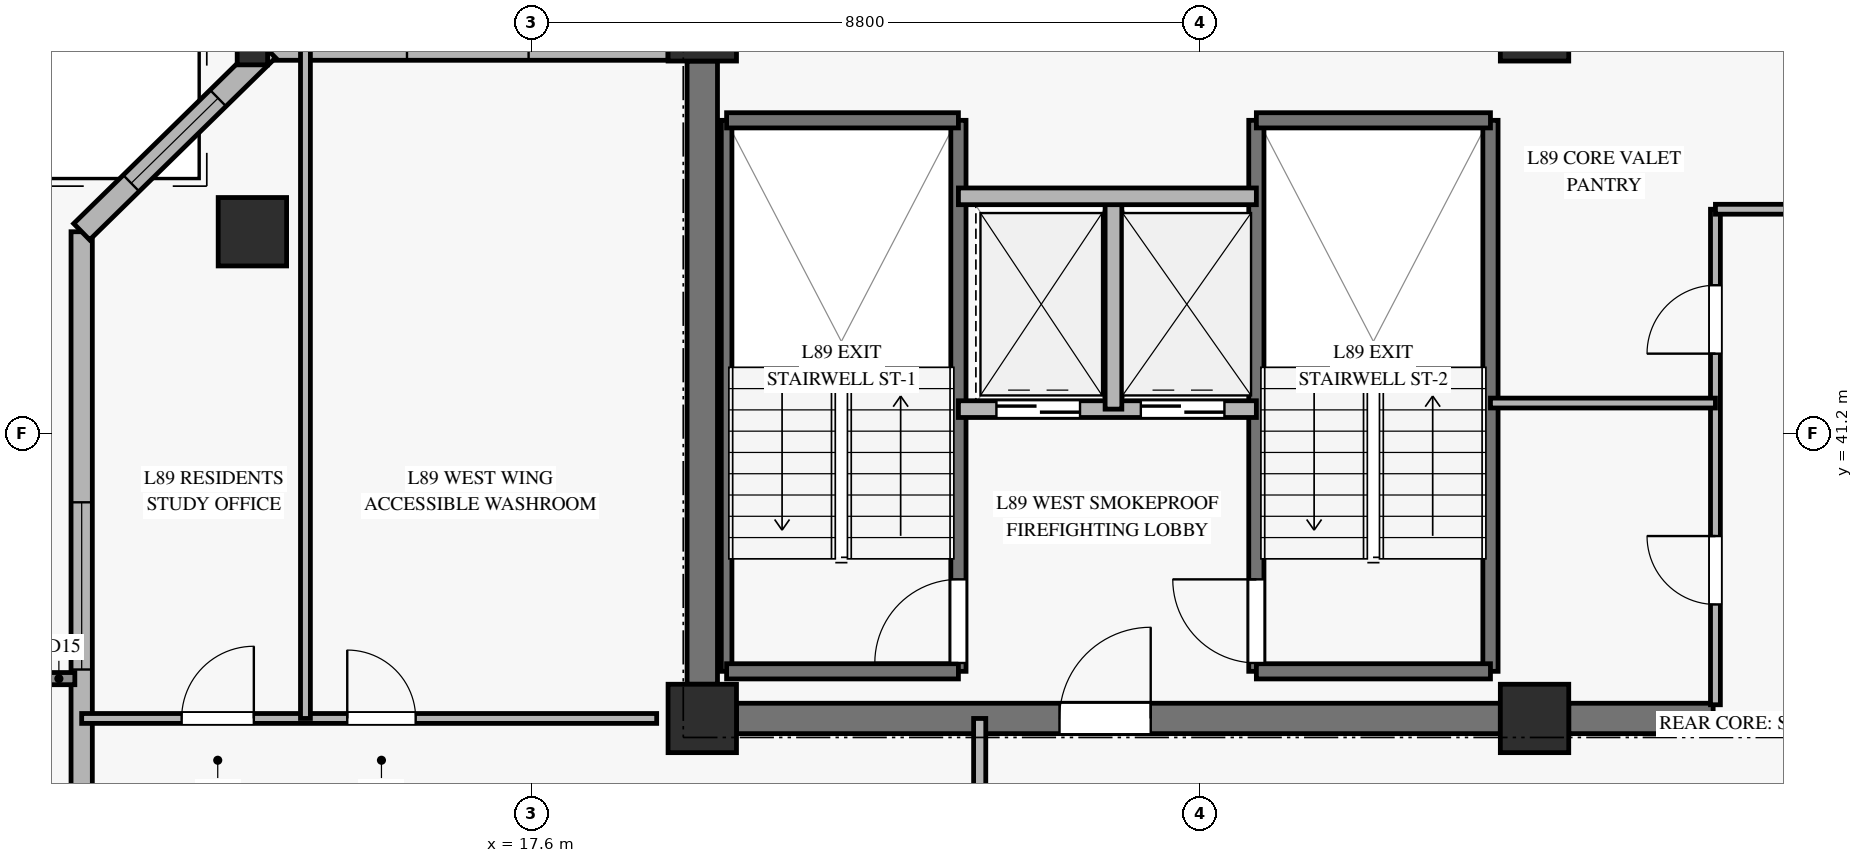
"""IFC4 building model, lengths in metres.
Left out: names, types, materials, properties, quantities, classifications, styles, units other than length and angle.
Written with IfcOpenShell. Run it as: python <this file> out.ifc"""

import sys

from ifc_helpers import new_model, si_unit, direction, frame, frame_2d, origin, origin_2d, place, context, subcontext, project, spatial, rectangle, hollow_rectangle, extrude, source, transform, mapped, element, fill, save


model = new_model("IFC4")
c1 = context("Model", 3, precision=1e-05, world=origin(), true_north=direction((0.0, 1.0)))
c2 = subcontext(c1, "Body", "Model", "MODEL_VIEW")
j1 = project(units=[si_unit("LENGTHUNIT", "METRE"), si_unit("PLANEANGLEUNIT", "RADIAN")], contexts=[c1])
p1 = place(None, origin())
s1 = spatial("IfcSite", under=j1, at=p1, CompositionType="ELEMENT")
p2 = place(p1, origin())
s2 = spatial("IfcBuilding", under=s1, at=p2, CompositionType="ELEMENT")
p3 = place(p2, frame((0.0, 0.0, 342.5)))
s3 = spatial("IfcBuildingStorey", under=s2, at=p3, CompositionType="ELEMENT", Elevation=342.5)
m1 = source(origin(), c2, "Body", "SweptSolid", [
    extrude(rectangle(XDim=0.9, YDim=0.9, at=origin_2d()), origin(), (0.0, 0.0, 1.0), 3.185),
])
for number, where, z_axis, x_axis in (
    (1, (19.85, 37.45, 0.0), (0.0, 0.0, 1.0), (1.0, 0.0, 0.0)),
    (2, (19.85, 46.55, 0.0), (0.0, 0.0, 1.0), (1.0, 0.0, 0.0)),
    (3, (30.8, 37.45, 0.0), (0.0, 0.0, 1.0), (1.0, 0.0, 0.0)),
    (4, (30.8, 46.55, 0.0), (0.0, 0.0, 1.0), (1.0, 0.0, 0.0)),
):
    element("IfcColumn", number, at=place(p3, frame(where, z_axis=z_axis, x_axis=x_axis)), inside=s3, PredefinedType="PILASTER", context=c2, shape_type="MappedRepresentation", body=[
        mapped(m1, transform((0.0, 0.0, 0.0), x_axis=(1.0, 0.0, 0.0), y_axis=(0.0, 1.0, 0.0), z_axis=(0.0, 0.0, 1.0), scale=1.0)),
    ])
p4 = place(p3, frame((20.3, 37.45, 0.0), z_axis=(0.0, 0.0, 1.0), x_axis=(1.0, 0.0, 0.0)))
e5 = element("IfcWall", 5, at=p4, inside=s3, PredefinedType="SHEAR", context=c2, shape_type="SweptSolid", body=[
    extrude(rectangle(XDim=10.05, YDim=0.4, at=frame_2d((5.025, 0.0))), origin(), (0.0, 0.0, 1.0), 3.185),
])
p5 = place(p4, frame((4.25, 0.0, 0.0)))
e6 = element("IfcOpeningElement", 6, at=p5, cuts=e5, PredefinedType="OPENING", context=c2, shape_type="SweptSolid", body=[
    extrude(rectangle(XDim=1.2, YDim=2.15, at=frame_2d((0.6, 1.075))), frame((0.0, 0.21, 0.0), z_axis=(0.0, -1.0, 0.0), x_axis=(1.0, 0.0, 0.0)), (0.0, 0.0, 1.0), 0.42),
])
p6 = place(p3, frame((31.25, 37.45, 0.0), z_axis=(0.0, 0.0, 1.0), x_axis=(1.0, 0.0, 0.0)))
e7 = element("IfcWall", 7, at=p6, inside=s3, PredefinedType="SHEAR", context=c2, shape_type="SweptSolid", body=[
    extrude(rectangle(XDim=1.9, YDim=0.4, at=frame_2d((0.95, 0.0))), origin(), (0.0, 0.0, 1.0), 3.185),
])
p7 = place(p3, frame((19.85, 37.9, 0.0), z_axis=(0.0, 0.0, 1.0), x_axis=(0.0, 1.0, 0.0)))
e8 = element("IfcWall", 8, at=p7, inside=s3, PredefinedType="SHEAR", context=c2, shape_type="SweptSolid", body=[
    extrude(rectangle(XDim=8.2, YDim=0.4, at=frame_2d((4.1, 0.0))), origin(), (0.0, 0.0, 1.0), 3.185),
])
m2 = source(origin(), c2, "Body", "SweptSolid", [
    extrude(hollow_rectangle(XDim=0.9, YDim=0.9, WallThickness=0.04, at=origin_2d()), origin(), (0.0, 0.0, 1.0), 3.207),
])
p8 = place(p3, frame((13.931, 43.854, 0.0), z_axis=(0.115115171504, 0.014313262065, 0.993249026085), x_axis=(-0.123388483821, 0.992358444344, 0.0)))
e9 = element("IfcColumn", 9, at=p8, inside=s3, PredefinedType="COLUMN", context=c2, shape_type="MappedRepresentation", body=[
    mapped(m2, transform((0.0, 0.0, 0.0), x_axis=(1.0, 0.0, 0.0), y_axis=(0.0, 1.0, 0.0), z_axis=(0.0, 0.0, 1.0), scale=1.0)),
])
m3 = source(origin(), c2, "Body", "SweptSolid", [
    extrude(hollow_rectangle(XDim=0.4, YDim=0.4, WallThickness=0.02, at=origin_2d()), origin(), (0.0, 0.0, 1.0), 3.206),
])
p9 = place(p3, frame((13.931, 46.25, 0.0), z_axis=(0.115126965108, 0.0, 0.993350784922), x_axis=(0.0, 1.0, 0.0)))
e10 = element("IfcColumn", 10, at=p9, inside=s3, PredefinedType="COLUMN", context=c2, shape_type="MappedRepresentation", body=[
    mapped(m3, transform((0.0, 0.0, 0.0), x_axis=(1.0, 0.0, 0.0), y_axis=(0.0, 1.0, 0.0), z_axis=(0.0, 0.0, 1.0), scale=1.0)),
])
p10 = place(p3, frame((11.685, 34.534, 0.0), z_axis=(0.0, 0.0, 1.0), x_axis=(0.0, 1.0, 0.0)))
e11 = element("IfcWall", 11, at=p10, inside=s3, PredefinedType="SOLIDWALL", context=c2, shape_type="SweptSolid", body=[
    extrude(rectangle(XDim=9.32, YDim=0.28, at=frame_2d((4.66, 0.0))), origin(), (0.0, 0.0, 1.0), 2.815),
])
p11 = place(p10, frame((3.56, 0.0, 0.45)))
e12 = element("IfcOpeningElement", 12, at=p11, cuts=e11, PredefinedType="OPENING", context=c2, shape_type="SweptSolid", body=[
    extrude(rectangle(XDim=2.2, YDim=2.1, at=frame_2d((1.1, 1.05))), frame((0.0, 0.15, 0.0), z_axis=(0.0, -1.0, 0.0), x_axis=(1.0, 0.0, 0.0)), (0.0, 0.0, 1.0), 0.3),
])
p12 = place(p3, frame((14.131, 46.25, 0.0), z_axis=(0.0, 0.0, 1.0), x_axis=(1.0, 0.0, 0.0)))
e13 = element("IfcWall", 13, at=p12, inside=s3, PredefinedType="SOLIDWALL", context=c2, shape_type="SweptSolid", body=[
    extrude(rectangle(XDim=5.269, YDim=0.28, at=frame_2d((2.634, 0.0))), origin(), (0.0, 0.0, 1.0), 2.815),
])
p13 = place(p12, frame((1.834, 0.0, 0.45)))
e14 = element("IfcOpeningElement", 14, at=p13, cuts=e13, PredefinedType="OPENING", context=c2, shape_type="SweptSolid", body=[
    extrude(rectangle(XDim=1.6, YDim=2.0, at=frame_2d((0.8, 1.0))), frame((0.0, 0.15, 0.0), z_axis=(0.0, -1.0, 0.0), x_axis=(1.0, 0.0, 0.0)), (0.0, 0.0, 1.0), 0.3),
])
p14 = place(p3, frame((14.131, 46.25, 0.0), z_axis=(0.0, 0.0, 1.0), x_axis=(-0.714377494024, -0.699760527632, 0.0)))
e15 = element("IfcWall", 15, at=p14, inside=s3, PredefinedType="SOLIDWALL", context=c2, shape_type="SweptSolid", body=[
    extrude(rectangle(XDim=3.424, YDim=0.3, at=frame_2d((1.712, 0.0))), origin(), (0.0, 0.0, 1.0), 2.815),
])
p15 = place(p14, frame((0.912, 0.0, 0.45)))
e16 = element("IfcOpeningElement", 16, at=p15, cuts=e15, PredefinedType="OPENING", context=c2, shape_type="SweptSolid", body=[
    extrude(rectangle(XDim=1.6, YDim=2.0, at=frame_2d((0.8, 1.0))), frame((0.0, 0.16, 0.0), z_axis=(0.0, -1.0, 0.0), x_axis=(1.0, 0.0, 0.0)), (0.0, 0.0, 1.0), 0.32),
])
p16 = place(p3, frame((20.17, 38.07, 0.0), z_axis=(0.0, 0.0, 1.0), x_axis=(0.0, 1.0, 0.0)))
e17 = element("IfcWall", 17, at=p16, inside=s3, PredefinedType="SOLIDWALL", context=c2, shape_type="SweptSolid", body=[
    extrude(rectangle(XDim=7.25, YDim=0.14, at=frame_2d((3.625, 0.0))), origin(), (0.0, 0.0, 1.0), 3.4),
])
p17 = place(p3, frame((23.22, 38.07, 0.0), z_axis=(0.0, 0.0, 1.0), x_axis=(0.0, 1.0, 0.0)))
e18 = element("IfcWall", 18, at=p17, inside=s3, PredefinedType="SOLIDWALL", context=c2, shape_type="SweptSolid", body=[
    extrude(rectangle(XDim=7.25, YDim=0.2, at=frame_2d((3.625, 0.0))), origin(), (0.0, 0.0, 1.0), 3.4),
])
p18 = place(p17, frame((0.11, 0.0, 0.0)))
e19 = element("IfcOpeningElement", 19, at=p18, cuts=e18, PredefinedType="OPENING", context=c2, shape_type="SweptSolid", body=[
    extrude(rectangle(XDim=1.1, YDim=2.15, at=frame_2d((0.55, 1.075))), frame((0.0, 0.11, 0.0), z_axis=(0.0, -1.0, 0.0), x_axis=(1.0, 0.0, 0.0)), (0.0, 0.0, 1.0), 0.22),
])
for number, where, z_axis, x_axis in (
    (20, (20.17, 45.32, 0.0), (0.0, 0.0, 1.0), (1.0, 0.0, 0.0)),
    (21, (20.17, 38.07, 0.0), (0.0, 0.0, 1.0), (1.0, 0.0, 0.0)),
):
    element("IfcWall", number, at=place(p3, frame(where, z_axis=z_axis, x_axis=x_axis)), inside=s3, PredefinedType="SOLIDWALL", context=c2, shape_type="SweptSolid", body=[
        extrude(rectangle(XDim=3.05, YDim=0.2, at=frame_2d((1.525, 0.0))), origin(), (0.0, 0.0, 1.0), 3.4),
    ])
p19 = place(p3, frame((27.14, 38.07, 0.0), z_axis=(0.0, 0.0, 1.0), x_axis=(0.0, 1.0, 0.0)))
e22 = element("IfcWall", 22, at=p19, inside=s3, PredefinedType="SOLIDWALL", context=c2, shape_type="SweptSolid", body=[
    extrude(rectangle(XDim=7.25, YDim=0.2, at=frame_2d((3.625, 0.0))), origin(), (0.0, 0.0, 1.0), 3.4),
])
p20 = place(p19, frame((0.11, 0.0, 0.0)))
e23 = element("IfcOpeningElement", 23, at=p20, cuts=e22, PredefinedType="OPENING", context=c2, shape_type="SweptSolid", body=[
    extrude(rectangle(XDim=1.1, YDim=2.15, at=frame_2d((0.55, 1.075))), frame((0.0, 0.11, 0.0), z_axis=(0.0, -1.0, 0.0), x_axis=(1.0, 0.0, 0.0)), (0.0, 0.0, 1.0), 0.22),
])
p21 = place(p3, frame((30.22, 38.07, 0.0), z_axis=(0.0, 0.0, 1.0), x_axis=(0.0, 1.0, 0.0)))
e24 = element("IfcWall", 24, at=p21, inside=s3, PredefinedType="SOLIDWALL", context=c2, shape_type="SweptSolid", body=[
    extrude(rectangle(XDim=7.25, YDim=0.2, at=frame_2d((3.625, 0.0))), origin(), (0.0, 0.0, 1.0), 3.4),
])
for number, where, z_axis, x_axis in (
    (25, (27.14, 45.32, 0.0), (0.0, 0.0, 1.0), (1.0, 0.0, 0.0)),
    (26, (27.14, 38.07, 0.0), (0.0, 0.0, 1.0), (1.0, 0.0, 0.0)),
):
    element("IfcWall", number, at=place(p3, frame(where, z_axis=z_axis, x_axis=x_axis)), inside=s3, PredefinedType="SOLIDWALL", context=c2, shape_type="SweptSolid", body=[
        extrude(rectangle(XDim=3.08, YDim=0.2, at=frame_2d((1.54, 0.0))), origin(), (0.0, 0.0, 1.0), 3.4),
    ])
p22 = place(p3, frame((23.22, 41.52, 0.0), z_axis=(0.0, 0.0, 1.0), x_axis=(1.0, 0.0, 0.0)))
e27 = element("IfcWall", 27, at=p22, inside=s3, PredefinedType="SOLIDWALL", context=c2, shape_type="SweptSolid", body=[
    extrude(rectangle(XDim=3.92, YDim=0.22, at=frame_2d((1.96, 0.0))), origin(), (0.0, 0.0, 1.0), 3.185),
])
p23 = place(p22, frame((0.5, 0.0, 0.0)))
e28 = element("IfcOpeningElement", 28, at=p23, cuts=e27, PredefinedType="OPENING", context=c2, shape_type="SweptSolid", body=[
    extrude(rectangle(XDim=1.1, YDim=2.2, at=frame_2d((0.55, 1.1))), frame((0.0, 0.12, 0.0), z_axis=(0.0, -1.0, 0.0), x_axis=(1.0, 0.0, 0.0)), (0.0, 0.0, 1.0), 0.24),
])
p24 = place(p22, frame((2.4, 0.0, 0.0)))
e29 = element("IfcOpeningElement", 29, at=p24, cuts=e27, PredefinedType="OPENING", context=c2, shape_type="SweptSolid", body=[
    extrude(rectangle(XDim=1.1, YDim=2.2, at=frame_2d((0.55, 1.1))), frame((0.0, 0.12, 0.0), z_axis=(0.0, -1.0, 0.0), x_axis=(1.0, 0.0, 0.0)), (0.0, 0.0, 1.0), 0.24),
])
p25 = place(p3, frame((25.26, 41.52, 0.0), z_axis=(0.0, 0.0, 1.0), x_axis=(0.0, 1.0, 0.0)))
e30 = element("IfcWall", 30, at=p25, inside=s3, PredefinedType="SOLIDWALL", context=c2, shape_type="SweptSolid", body=[
    extrude(rectangle(XDim=2.8, YDim=0.22, at=frame_2d((1.4, 0.0))), origin(), (0.0, 0.0, 1.0), 3.185),
])
p26 = place(p3, frame((23.22, 44.32, 0.0), z_axis=(0.0, 0.0, 1.0), x_axis=(1.0, 0.0, 0.0)))
e31 = element("IfcWall", 31, at=p26, inside=s3, PredefinedType="SOLIDWALL", context=c2, shape_type="SweptSolid", body=[
    extrude(rectangle(XDim=3.92, YDim=0.22, at=frame_2d((1.96, 0.0))), origin(), (0.0, 0.0, 1.0), 3.185),
])
p27 = place(p3, frame((33.18, 37.63, 0.0), z_axis=(0.0, 0.0, 1.0), x_axis=(0.0, 1.0, 0.0)))
e32 = element("IfcWall", 32, at=p27, inside=s3, PredefinedType="PARTITIONING", context=c2, shape_type="SweptSolid", body=[
    extrude(rectangle(XDim=6.52, YDim=0.13, at=frame_2d((3.26, 0.0))), origin(), (0.0, 0.0, 1.0), 2.27),
])
p28 = place(p27, frame((1.32, 0.0, 0.0)))
e33 = element("IfcOpeningElement", 33, at=p28, cuts=e32, PredefinedType="OPENING", context=c2, shape_type="SweptSolid", body=[
    extrude(rectangle(XDim=0.9, YDim=2.1, at=frame_2d((0.45, 1.05))), frame((0.0, 0.075, 0.0), z_axis=(0.0, -1.0, 0.0), x_axis=(1.0, 0.0, 0.0)), (0.0, 0.0, 1.0), 0.15),
])
p29 = place(p27, frame((4.62, 0.0, 0.0)))
e34 = element("IfcOpeningElement", 34, at=p29, cuts=e32, PredefinedType="OPENING", context=c2, shape_type="SweptSolid", body=[
    extrude(rectangle(XDim=0.9, YDim=2.1, at=frame_2d((0.45, 1.05))), frame((0.0, 0.075, 0.0), z_axis=(0.0, -1.0, 0.0), x_axis=(1.0, 0.0, 0.0)), (0.0, 0.0, 1.0), 0.15),
])
p30 = place(p3, frame((33.18, 44.15, 0.0), z_axis=(0.0, 0.0, 1.0), x_axis=(1.0, 0.0, 0.0)))
e35 = element("IfcWall", 35, at=p30, inside=s3, PredefinedType="PARTITIONING", context=c2, shape_type="SweptSolid", body=[
    extrude(rectangle(XDim=2.94, YDim=0.13, at=frame_2d((1.47, 0.0))), origin(), (0.0, 0.0, 1.0), 2.47),
])
p31 = place(p3, frame((30.22, 41.6, 0.0), z_axis=(0.0, 0.0, 1.0), x_axis=(1.0, 0.0, 0.0)))
e36 = element("IfcWall", 36, at=p31, inside=s3, PredefinedType="PARTITIONING", context=c2, shape_type="SweptSolid", body=[
    extrude(rectangle(XDim=2.96, YDim=0.13, at=frame_2d((1.48, 0.0))), origin(), (0.0, 0.0, 1.0), 2.47),
])
p32 = place(p3, frame((23.5, 22.568, 0.0), z_axis=(0.0, 0.0, 1.0), x_axis=(0.0, 1.0, 0.0)))
e37 = element("IfcWall", 37, at=p32, inside=s3, PredefinedType="PARTITIONING", context=c2, shape_type="SweptSolid", body=[
    extrude(rectangle(XDim=14.882, YDim=0.16, at=frame_2d((7.441, 0.0))), origin(), (0.0, 0.0, 1.0), 2.77),
])
p33 = place(p32, frame((12.352, 0.0, 0.0)))
e38 = element("IfcOpeningElement", 38, at=p33, cuts=e37, PredefinedType="OPENING", context=c2, shape_type="SweptSolid", body=[
    extrude(rectangle(XDim=1.05, YDim=2.15, at=frame_2d((0.525, 1.075))), frame((0.0, 0.09, 0.0), z_axis=(0.0, -1.0, 0.0), x_axis=(1.0, 0.0, 0.0)), (0.0, 0.0, 1.0), 0.18),
])
p34 = place(p3, frame((11.685, 37.45, 0.0), z_axis=(0.0, 0.0, 1.0), x_axis=(1.0, 0.0, 0.0)))
e39 = element("IfcWall", 39, at=p34, inside=s3, PredefinedType="PARTITIONING", context=c2, shape_type="SweptSolid", body=[
    extrude(rectangle(XDim=7.565, YDim=0.13, at=frame_2d((3.782, 0.0))), origin(), (0.0, 0.0, 1.0), 2.82),
])
p35 = place(p34, frame((1.315, 0.0, 0.0)))
e40 = element("IfcOpeningElement", 40, at=p35, cuts=e39, PredefinedType="OPENING", context=c2, shape_type="SweptSolid", body=[
    extrude(rectangle(XDim=0.95, YDim=2.1, at=frame_2d((0.475, 1.05))), frame((0.0, 0.075, 0.0), z_axis=(0.0, -1.0, 0.0), x_axis=(1.0, 0.0, 0.0)), (0.0, 0.0, 1.0), 0.15),
])
p36 = place(p34, frame((3.494, 0.0, 0.0)))
e41 = element("IfcOpeningElement", 41, at=p36, cuts=e39, PredefinedType="OPENING", context=c2, shape_type="SweptSolid", body=[
    extrude(rectangle(XDim=0.9, YDim=2.1, at=frame_2d((0.45, 1.05))), frame((0.0, 0.075, 0.0), z_axis=(0.0, -1.0, 0.0), x_axis=(1.0, 0.0, 0.0)), (0.0, 0.0, 1.0), 0.15),
])
p37 = place(p3, frame((14.629, 37.45, 0.0), z_axis=(0.0, 0.0, 1.0), x_axis=(0.0, 1.0, 0.0)))
e42 = element("IfcWall", 42, at=p37, inside=s3, PredefinedType="PARTITIONING", context=c2, shape_type="SweptSolid", body=[
    extrude(rectangle(XDim=8.8, YDim=0.13, at=frame_2d((4.4, 0.0))), origin(), (0.0, 0.0, 1.0), 2.82),
])
m4 = source(origin(), c2, "Body", "SweptSolid", [
    extrude(rectangle(XDim=2.2, YDim=2.1, at=frame_2d((1.1, 1.05))), frame((0.0, 0.03, 0.0), z_axis=(0.0, -1.0, 0.0), x_axis=(1.0, 0.0, 0.0)), (0.0, 0.0, 1.0), 0.06),
])
p38 = place(p11, origin())
e43 = element("IfcWindow", 43, at=p38, inside=s3, PartitioningType="SINGLE_PANEL", PredefinedType="WINDOW", context=c2, shape_type="MappedRepresentation", body=[
    mapped(m4, transform((0.0, 0.0, 0.0), x_axis=(1.0, 0.0, 0.0), y_axis=(0.0, 1.0, 0.0), z_axis=(0.0, 0.0, 1.0), scale=1.0)),
])
fill(e12, e43)
m5 = source(origin(), c2, "Body", "SweptSolid", [
    extrude(rectangle(XDim=1.6, YDim=2.0, at=frame_2d((0.8, 1.0))), frame((0.0, 0.03, 0.0), z_axis=(0.0, -1.0, 0.0), x_axis=(1.0, 0.0, 0.0)), (0.0, 0.0, 1.0), 0.06),
])
p39 = place(p15, origin())
e44 = element("IfcWindow", 44, at=p39, inside=s3, PartitioningType="SINGLE_PANEL", PredefinedType="WINDOW", context=c2, shape_type="MappedRepresentation", body=[
    mapped(m5, transform((0.0, 0.0, 0.0), x_axis=(1.0, 0.0, 0.0), y_axis=(0.0, 1.0, 0.0), z_axis=(0.0, 0.0, 1.0), scale=1.0)),
])
fill(e16, e44)
m6 = source(origin(), c2, "Body", "SweptSolid", [
    extrude(rectangle(XDim=1.1, YDim=2.15, at=frame_2d((0.55, 1.075))), frame((0.0, 0.025, 0.0), z_axis=(0.0, -1.0, 0.0), x_axis=(1.0, 0.0, 0.0)), (0.0, 0.0, 1.0), 0.05),
])
p40 = place(p18, origin())
e45 = element("IfcDoor", 45, at=p40, inside=s3, OperationType="SINGLE_SWING_LEFT", PredefinedType="DOOR", context=c2, shape_type="MappedRepresentation", body=[
    mapped(m6, transform((0.0, 0.0, 0.0), x_axis=(1.0, 0.0, 0.0), y_axis=(0.0, 1.0, 0.0), z_axis=(0.0, 0.0, 1.0), scale=1.0)),
])
fill(e19, e45)
p41 = place(p20, origin())
e46 = element("IfcDoor", 46, at=p41, inside=s3, OperationType="SINGLE_SWING_RIGHT", PredefinedType="DOOR", context=c2, shape_type="MappedRepresentation", body=[
    mapped(m6, transform((0.0, 0.0, 0.0), x_axis=(1.0, 0.0, 0.0), y_axis=(0.0, 1.0, 0.0), z_axis=(0.0, 0.0, 1.0), scale=1.0)),
])
fill(e23, e46)
m7 = source(origin(), c2, "Body", "SweptSolid", [
    extrude(rectangle(XDim=1.1, YDim=2.2, at=frame_2d((0.55, 1.1))), frame((0.0, 0.025, 0.0), z_axis=(0.0, -1.0, 0.0), x_axis=(1.0, 0.0, 0.0)), (0.0, 0.0, 1.0), 0.05),
])
p42 = place(p23, origin())
e47 = element("IfcDoor", 47, at=p42, inside=s3, OperationType="SLIDING_TO_LEFT", PredefinedType="DOOR", context=c2, shape_type="MappedRepresentation", body=[
    mapped(m7, transform((0.0, 0.0, 0.0), x_axis=(1.0, 0.0, 0.0), y_axis=(0.0, 1.0, 0.0), z_axis=(0.0, 0.0, 1.0), scale=1.0)),
])
fill(e28, e47)
p43 = place(p24, origin())
e48 = element("IfcDoor", 48, at=p43, inside=s3, OperationType="SLIDING_TO_LEFT", PredefinedType="DOOR", context=c2, shape_type="MappedRepresentation", body=[
    mapped(m7, transform((0.0, 0.0, 0.0), x_axis=(1.0, 0.0, 0.0), y_axis=(0.0, 1.0, 0.0), z_axis=(0.0, 0.0, 1.0), scale=1.0)),
])
fill(e29, e48)
m8 = source(origin(), c2, "Body", "SweptSolid", [
    extrude(rectangle(XDim=1.2, YDim=2.15, at=frame_2d((0.6, 1.075))), frame((0.0, 0.025, 0.0), z_axis=(0.0, -1.0, 0.0), x_axis=(1.0, 0.0, 0.0)), (0.0, 0.0, 1.0), 0.05),
])
p44 = place(p5, origin())
e49 = element("IfcDoor", 49, at=p44, inside=s3, OperationType="SINGLE_SWING_RIGHT", PredefinedType="DOOR", context=c2, shape_type="MappedRepresentation", body=[
    mapped(m8, transform((0.0, 0.0, 0.0), x_axis=(1.0, 0.0, 0.0), y_axis=(0.0, 1.0, 0.0), z_axis=(0.0, 0.0, 1.0), scale=1.0)),
])
fill(e6, e49)
m9 = source(origin(), c2, "Body", "SweptSolid", [
    extrude(rectangle(XDim=0.9, YDim=2.1, at=frame_2d((0.45, 1.05))), frame((0.0, 0.025, 0.0), z_axis=(0.0, -1.0, 0.0), x_axis=(1.0, 0.0, 0.0)), (0.0, 0.0, 1.0), 0.05),
])
p45 = place(p28, origin())
e50 = element("IfcDoor", 50, at=p45, inside=s3, OperationType="SINGLE_SWING_RIGHT", PredefinedType="DOOR", context=c2, shape_type="MappedRepresentation", body=[
    mapped(m9, transform((0.0, 0.0, 0.0), x_axis=(1.0, 0.0, 0.0), y_axis=(0.0, 1.0, 0.0), z_axis=(0.0, 0.0, 1.0), scale=1.0)),
])
fill(e33, e50)
p46 = place(p29, origin())
e51 = element("IfcDoor", 51, at=p46, inside=s3, OperationType="SINGLE_SWING_LEFT", PredefinedType="DOOR", context=c2, shape_type="MappedRepresentation", body=[
    mapped(m9, transform((0.0, 0.0, 0.0), x_axis=(1.0, 0.0, 0.0), y_axis=(0.0, 1.0, 0.0), z_axis=(0.0, 0.0, 1.0), scale=1.0)),
])
fill(e34, e51)
m10 = source(origin(), c2, "Body", "SweptSolid", [
    extrude(rectangle(XDim=0.95, YDim=2.1, at=frame_2d((0.475, 1.05))), frame((0.0, 0.025, 0.0), z_axis=(0.0, -1.0, 0.0), x_axis=(1.0, 0.0, 0.0)), (0.0, 0.0, 1.0), 0.05),
])
p47 = place(p35, origin())
e52 = element("IfcDoor", 52, at=p47, inside=s3, OperationType="SINGLE_SWING_RIGHT", PredefinedType="DOOR", context=c2, shape_type="MappedRepresentation", body=[
    mapped(m10, transform((0.0, 0.0, 0.0), x_axis=(1.0, 0.0, 0.0), y_axis=(0.0, 1.0, 0.0), z_axis=(0.0, 0.0, 1.0), scale=1.0)),
])
fill(e40, e52)
p48 = place(p36, origin())
e53 = element("IfcDoor", 53, at=p48, inside=s3, OperationType="SINGLE_SWING_LEFT", PredefinedType="DOOR", context=c2, shape_type="MappedRepresentation", body=[
    mapped(m9, transform((0.0, 0.0, 0.0), x_axis=(1.0, 0.0, 0.0), y_axis=(0.0, 1.0, 0.0), z_axis=(0.0, 0.0, 1.0), scale=1.0)),
])
fill(e41, e53)
save(model, sys.argv[1])
